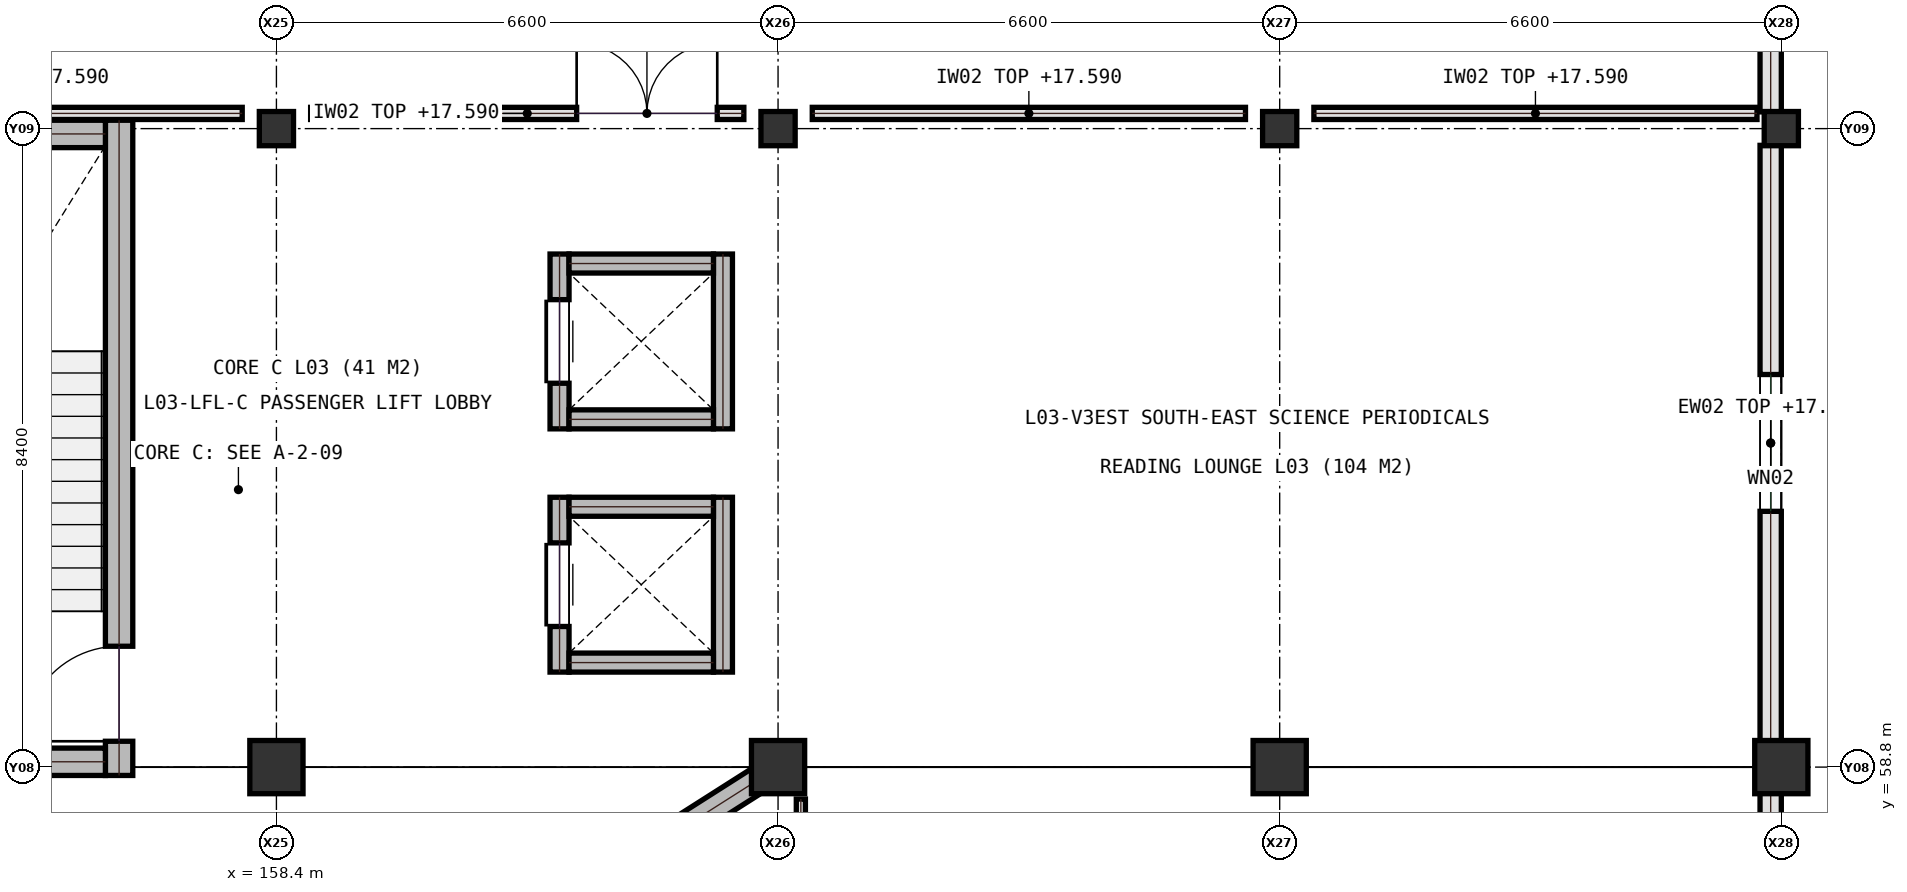
"""IFC4 building model, lengths in metres.
Left out: names, types, materials, properties, quantities, classifications, styles, units other than length and angle.
Written with IfcOpenShell. Run it as: python <this file> out.ifc"""

import sys

from ifc_helpers import new_model, si_unit, direction, frame, frame_2d, origin, origin_2d, place, context, subcontext, project, spatial, rectangle, extrude, element, fill, save


model = new_model("IFC4")
c1 = context("Model", 3, precision=1e-05, world=origin(), true_north=direction((0.0, 1.0)))
c2 = subcontext(c1, "Body", "Model", "MODEL_VIEW")
j1 = project(units=[si_unit("LENGTHUNIT", "METRE"), si_unit("PLANEANGLEUNIT", "RADIAN")], contexts=[c1])
p1 = place(None, origin())
s1 = spatial("IfcSite", under=j1, at=p1, CompositionType="ELEMENT")
p2 = place(p1, origin())
s2 = spatial("IfcBuilding", under=s1, at=p2, CompositionType="ELEMENT")
p3 = place(p2, frame((0.0, 0.0, 14.4)))
s3 = spatial("IfcBuildingStorey", under=s2, at=p3, CompositionType="ELEMENT", Elevation=14.4)
p4 = place(p3, frame((158.4, 58.8, 0.0), z_axis=(0.0, 0.0, 1.0), x_axis=(1.0, 0.0, 0.0)))
e1 = element("IfcColumn", 1, at=p4, inside=s3, PredefinedType="COLUMN", context=c2, shape_type="SweptSolid", body=[
    extrude(rectangle(XDim=0.7, YDim=0.7, at=origin_2d()), origin(), (0.0, 0.0, 1.0), 4.2),
])
p5 = place(p3, frame((158.4, 67.2, 0.0), z_axis=(0.0, 0.0, 1.0), x_axis=(1.0, 0.0, 0.0)))
e2 = element("IfcColumn", 2, at=p5, inside=s3, PredefinedType="COLUMN", context=c2, shape_type="SweptSolid", body=[
    extrude(rectangle(XDim=0.45, YDim=0.45, at=origin_2d()), origin(), (0.0, 0.0, 1.0), 4.2),
])
p6 = place(p3, frame((165.0, 58.8, 0.0), z_axis=(0.0, 0.0, 1.0), x_axis=(1.0, 0.0, 0.0)))
e3 = element("IfcColumn", 3, at=p6, inside=s3, PredefinedType="COLUMN", context=c2, shape_type="SweptSolid", body=[
    extrude(rectangle(XDim=0.7, YDim=0.7, at=origin_2d()), origin(), (0.0, 0.0, 1.0), 4.2),
])
p7 = place(p3, frame((165.0, 67.2, 0.0), z_axis=(0.0, 0.0, 1.0), x_axis=(1.0, 0.0, 0.0)))
e4 = element("IfcColumn", 4, at=p7, inside=s3, PredefinedType="COLUMN", context=c2, shape_type="SweptSolid", body=[
    extrude(rectangle(XDim=0.45, YDim=0.45, at=origin_2d()), origin(), (0.0, 0.0, 1.0), 4.2),
])
p8 = place(p3, frame((171.6, 58.8, 0.0), z_axis=(0.0, 0.0, 1.0), x_axis=(1.0, 0.0, 0.0)))
e5 = element("IfcColumn", 5, at=p8, inside=s3, PredefinedType="COLUMN", context=c2, shape_type="SweptSolid", body=[
    extrude(rectangle(XDim=0.7, YDim=0.7, at=origin_2d()), origin(), (0.0, 0.0, 1.0), 4.2),
])
p9 = place(p3, frame((171.6, 67.2, 0.0), z_axis=(0.0, 0.0, 1.0), x_axis=(1.0, 0.0, 0.0)))
e6 = element("IfcColumn", 6, at=p9, inside=s3, PredefinedType="COLUMN", context=c2, shape_type="SweptSolid", body=[
    extrude(rectangle(XDim=0.45, YDim=0.45, at=origin_2d()), origin(), (0.0, 0.0, 1.0), 4.2),
])
p10 = place(p3, frame((178.2, 58.8, 0.0), z_axis=(0.0, 0.0, 1.0), x_axis=(1.0, 0.0, 0.0)))
e7 = element("IfcColumn", 7, at=p10, inside=s3, PredefinedType="COLUMN", context=c2, shape_type="SweptSolid", body=[
    extrude(rectangle(XDim=0.7, YDim=0.7, at=origin_2d()), origin(), (0.0, 0.0, 1.0), 4.2),
])
p11 = place(p3, frame((178.2, 67.2, 0.0), z_axis=(0.0, 0.0, 1.0), x_axis=(1.0, 0.0, 0.0)))
e8 = element("IfcColumn", 8, at=p11, inside=s3, PredefinedType="COLUMN", context=c2, shape_type="SweptSolid", body=[
    extrude(rectangle(XDim=0.45, YDim=0.45, at=origin_2d()), origin(), (0.0, 0.0, 1.0), 4.2),
])
p12 = place(p3, frame((152.0, 67.4, 0.0), z_axis=(0.0, 0.0, 1.0), x_axis=(1.0, 0.0, 0.0)))
e9 = element("IfcWall", 9, at=p12, inside=s3, PredefinedType="PARTITIONING", context=c2, shape_type="SweptSolid", body=[
    extrude(rectangle(XDim=5.95, YDim=0.16, at=frame_2d((2.975, 0.0))), origin(), (0.0, 0.0, 1.0), 3.19),
])
p13 = place(p3, frame((158.85, 67.4, 0.0), z_axis=(0.0, 0.0, 1.0), x_axis=(1.0, 0.0, 0.0)))
e10 = element("IfcWall", 10, at=p13, inside=s3, PredefinedType="PARTITIONING", context=c2, shape_type="SweptSolid", body=[
    extrude(rectangle(XDim=5.7, YDim=0.16, at=frame_2d((2.85, 0.0))), origin(), (0.0, 0.0, 1.0), 3.19),
])
p14 = place(p13, frame((3.5, 0.0, 0.0)))
e11 = element("IfcOpeningElement", 11, at=p14, cuts=e10, PredefinedType="OPENING", context=c2, shape_type="SweptSolid", body=[
    extrude(rectangle(XDim=1.85, YDim=2.25, at=frame_2d((0.925, 1.125))), frame((0.0, 0.09, 0.0), z_axis=(0.0, -1.0, 0.0), x_axis=(1.0, 0.0, 0.0)), (0.0, 0.0, 1.0), 0.18),
])
p15 = place(p3, frame((165.45, 67.4, 0.0), z_axis=(0.0, 0.0, 1.0), x_axis=(1.0, 0.0, 0.0)))
e12 = element("IfcWall", 12, at=p15, inside=s3, PredefinedType="PARTITIONING", context=c2, shape_type="SweptSolid", body=[
    extrude(rectangle(XDim=5.7, YDim=0.16, at=frame_2d((2.85, 0.0))), origin(), (0.0, 0.0, 1.0), 3.19),
])
p16 = place(p3, frame((172.05, 67.4, 0.0), z_axis=(0.0, 0.0, 1.0), x_axis=(1.0, 0.0, 0.0)))
e13 = element("IfcWall", 13, at=p16, inside=s3, PredefinedType="PARTITIONING", context=c2, shape_type="SweptSolid", body=[
    extrude(rectangle(XDim=5.83, YDim=0.16, at=frame_2d((2.915, 0.0))), origin(), (0.0, 0.0, 1.0), 3.19),
])
p17 = place(p3, frame((165.3, 50.85, 0.0), z_axis=(0.0, 0.0, 1.0), x_axis=(0.0, 1.0, 0.0)))
e14 = element("IfcWall", 14, at=p17, inside=s3, PredefinedType="PARTITIONING", context=c2, shape_type="SweptSolid", body=[
    extrude(rectangle(XDim=7.53, YDim=0.12, at=frame_2d((3.765, 0.0))), origin(), (0.0, 0.0, 1.0), 3.19),
])
p18 = place(p17, frame((4.4, 0.0, 0.0)))
e15 = element("IfcOpeningElement", 15, at=p18, cuts=e14, PredefinedType="OPENING", context=c2, shape_type="SweptSolid", body=[
    extrude(rectangle(XDim=0.95, YDim=2.15, at=frame_2d((0.475, 1.075))), frame((0.0, 0.07, 0.0), z_axis=(0.0, -1.0, 0.0), x_axis=(1.0, 0.0, 0.0)), (0.0, 0.0, 1.0), 0.14),
])
p19 = place(p3, frame((178.06, 50.745, 0.0), z_axis=(0.0, 0.0, 1.0), x_axis=(0.0, 1.0, 0.0)))
e16 = element("IfcWall", 16, at=p19, inside=s3, PredefinedType="SOLIDWALL", context=c2, shape_type="SweptSolid", body=[
    extrude(rectangle(XDim=7.71, YDim=0.28, at=frame_2d((3.855, 0.0))), origin(), (0.0, 0.0, 1.0), 3.225),
])
p20 = place(p19, frame((3.13, 0.0, 0.95)))
e17 = element("IfcOpeningElement", 17, at=p20, cuts=e16, PredefinedType="OPENING", context=c2, shape_type="SweptSolid", body=[
    extrude(rectangle(XDim=1.45, YDim=1.6, at=frame_2d((0.725, 0.8))), frame((0.0, 0.15, 0.0), z_axis=(0.0, -1.0, 0.0), x_axis=(1.0, 0.0, 0.0)), (0.0, 0.0, 1.0), 0.3),
])
p21 = place(p3, frame((178.06, 59.145, 0.0), z_axis=(0.0, 0.0, 1.0), x_axis=(0.0, 1.0, 0.0)))
e18 = element("IfcWall", 18, at=p21, inside=s3, PredefinedType="SOLIDWALL", context=c2, shape_type="SweptSolid", body=[
    extrude(rectangle(XDim=7.835, YDim=0.28, at=frame_2d((3.917, 0.0))), origin(), (0.0, 0.0, 1.0), 3.375),
])
p22 = place(p21, frame((3.02, 0.0, 0.95)))
e19 = element("IfcOpeningElement", 19, at=p22, cuts=e18, PredefinedType="OPENING", context=c2, shape_type="SweptSolid", body=[
    extrude(rectangle(XDim=1.8, YDim=1.6, at=frame_2d((0.9, 0.8))), frame((0.0, 0.15, 0.0), z_axis=(0.0, -1.0, 0.0), x_axis=(1.0, 0.0, 0.0)), (0.0, 0.0, 1.0), 0.3),
])
p23 = place(p3, frame((178.06, 67.42, 0.0), z_axis=(0.0, 0.0, 1.0), x_axis=(0.0, 1.0, 0.0)))
e20 = element("IfcWall", 20, at=p23, inside=s3, PredefinedType="SOLIDWALL", context=c2, shape_type="SweptSolid", body=[
    extrude(rectangle(XDim=7.96, YDim=0.28, at=frame_2d((3.98, 0.0))), origin(), (0.0, 0.0, 1.0), 3.225),
])
p24 = place(p23, frame((3.23, 0.0, 0.95)))
e21 = element("IfcOpeningElement", 21, at=p24, cuts=e20, PredefinedType="OPENING", context=c2, shape_type="SweptSolid", body=[
    extrude(rectangle(XDim=1.5, YDim=2.1, at=frame_2d((0.75, 1.05))), frame((0.0, 0.15, 0.0), z_axis=(0.0, -1.0, 0.0), x_axis=(1.0, 0.0, 0.0)), (0.0, 0.0, 1.0), 0.3),
])
p25 = place(p3, frame((158.65, 54.76, 0.0), z_axis=(0.0, 0.0, 1.0), x_axis=(0.843786613851, 0.536678814829, 0.0)))
e22 = element("IfcWall", 22, at=p25, inside=s3, PredefinedType="SHEAR", context=c2, shape_type="SweptSolid", body=[
    extrude(rectangle(XDim=7.229, YDim=0.34, at=frame_2d((3.615, 0.0))), origin(), (0.0, 0.0, 1.0), 3.94),
])
p26 = place(p3, frame((156.33, 58.69, 0.0), z_axis=(0.0, 0.0, 1.0), x_axis=(0.0, 1.0, 0.0)))
e23 = element("IfcWall", 23, at=p26, inside=s3, PredefinedType="SHEAR", context=c2, shape_type="SweptSolid", body=[
    extrude(rectangle(XDim=8.62, YDim=0.36, at=frame_2d((4.31, 0.0))), origin(), (0.0, 0.0, 1.0), 3.94),
])
p27 = place(p26, frame((0.45, 0.0, 0.0)))
e24 = element("IfcOpeningElement", 24, at=p27, cuts=e23, PredefinedType="OPENING", context=c2, shape_type="SweptSolid", body=[
    extrude(rectangle(XDim=1.25, YDim=2.15, at=frame_2d((0.625, 1.075))), frame((0.0, 0.19, 0.0), z_axis=(0.0, -1.0, 0.0), x_axis=(1.0, 0.0, 0.0)), (0.0, 0.0, 1.0), 0.38),
])
for number, where, z_axis, x_axis in (
    (25, (152.35, 67.13, 0.0), (0.0, 0.0, 1.0), (1.0, 0.0, 0.0)),
    (26, (152.35, 58.87, 0.0), (0.0, 0.0, 1.0), (1.0, 0.0, 0.0)),
):
    element("IfcWall", number, at=place(p3, frame(where, z_axis=z_axis, x_axis=x_axis)), inside=s3, PredefinedType="SHEAR", context=c2, shape_type="SweptSolid", body=[
        extrude(rectangle(XDim=3.8, YDim=0.36, at=frame_2d((1.9, 0.0))), origin(), (0.0, 0.0, 1.0), 3.94),
    ])
p28 = place(p3, frame((162.125, 60.05, 0.0), z_axis=(0.0, 0.0, 1.0), x_axis=(0.0, 1.0, 0.0)))
e27 = element("IfcWall", 27, at=p28, inside=s3, PredefinedType="SHEAR", context=c2, shape_type="SweptSolid", body=[
    extrude(rectangle(XDim=2.3, YDim=0.25, at=frame_2d((1.15, 0.0))), origin(), (0.0, 0.0, 1.0), 3.94),
])
p29 = place(p28, frame((0.6, 0.0, 0.0)))
e28 = element("IfcOpeningElement", 28, at=p29, cuts=e27, PredefinedType="OPENING", context=c2, shape_type="SweptSolid", body=[
    extrude(rectangle(XDim=1.1, YDim=2.15, at=frame_2d((0.55, 1.075))), frame((0.0, 0.135, 0.0), z_axis=(0.0, -1.0, 0.0), x_axis=(1.0, 0.0, 0.0)), (0.0, 0.0, 1.0), 0.27),
])
p30 = place(p3, frame((164.275, 60.05, 0.0), z_axis=(0.0, 0.0, 1.0), x_axis=(0.0, 1.0, 0.0)))
e29 = element("IfcWall", 29, at=p30, inside=s3, PredefinedType="SHEAR", context=c2, shape_type="SweptSolid", body=[
    extrude(rectangle(XDim=2.3, YDim=0.25, at=frame_2d((1.15, 0.0))), origin(), (0.0, 0.0, 1.0), 3.94),
])
for number, where, z_axis, x_axis in (
    (30, (162.25, 60.175, 0.0), (0.0, 0.0, 1.0), (1.0, 0.0, 0.0)),
    (31, (162.25, 62.225, 0.0), (0.0, 0.0, 1.0), (1.0, 0.0, 0.0)),
):
    element("IfcWall", number, at=place(p3, frame(where, z_axis=z_axis, x_axis=x_axis)), inside=s3, PredefinedType="SHEAR", context=c2, shape_type="SweptSolid", body=[
        extrude(rectangle(XDim=1.9, YDim=0.25, at=frame_2d((0.95, 0.0))), origin(), (0.0, 0.0, 1.0), 3.94),
    ])
p31 = place(p3, frame((162.125, 63.25, 0.0), z_axis=(0.0, 0.0, 1.0), x_axis=(0.0, 1.0, 0.0)))
e32 = element("IfcWall", 32, at=p31, inside=s3, PredefinedType="SHEAR", context=c2, shape_type="SweptSolid", body=[
    extrude(rectangle(XDim=2.3, YDim=0.25, at=frame_2d((1.15, 0.0))), origin(), (0.0, 0.0, 1.0), 3.94),
])
p32 = place(p31, frame((0.6, 0.0, 0.0)))
e33 = element("IfcOpeningElement", 33, at=p32, cuts=e32, PredefinedType="OPENING", context=c2, shape_type="SweptSolid", body=[
    extrude(rectangle(XDim=1.1, YDim=2.15, at=frame_2d((0.55, 1.075))), frame((0.0, 0.135, 0.0), z_axis=(0.0, -1.0, 0.0), x_axis=(1.0, 0.0, 0.0)), (0.0, 0.0, 1.0), 0.27),
])
p33 = place(p3, frame((164.275, 63.25, 0.0), z_axis=(0.0, 0.0, 1.0), x_axis=(0.0, 1.0, 0.0)))
e34 = element("IfcWall", 34, at=p33, inside=s3, PredefinedType="SHEAR", context=c2, shape_type="SweptSolid", body=[
    extrude(rectangle(XDim=2.3, YDim=0.25, at=frame_2d((1.15, 0.0))), origin(), (0.0, 0.0, 1.0), 3.94),
])
for number, where, z_axis, x_axis in (
    (35, (162.25, 63.375, 0.0), (0.0, 0.0, 1.0), (1.0, 0.0, 0.0)),
    (36, (162.25, 65.425, 0.0), (0.0, 0.0, 1.0), (1.0, 0.0, 0.0)),
):
    element("IfcWall", number, at=place(p3, frame(where, z_axis=z_axis, x_axis=x_axis)), inside=s3, PredefinedType="SHEAR", context=c2, shape_type="SweptSolid", body=[
        extrude(rectangle(XDim=1.9, YDim=0.25, at=frame_2d((0.95, 0.0))), origin(), (0.0, 0.0, 1.0), 3.94),
    ])
p34 = place(p14, origin())
e37 = element("IfcDoor", 37, at=p34, inside=s3, OperationType="DOUBLE_DOOR_SINGLE_SWING", PredefinedType="DOOR", context=c2, shape_type="SweptSolid", body=[
    extrude(rectangle(XDim=1.85, YDim=2.25, at=frame_2d((0.925, 1.125))), frame((0.0, 0.025, 0.0), z_axis=(0.0, -1.0, 0.0), x_axis=(1.0, 0.0, 0.0)), (0.0, 0.0, 1.0), 0.05),
])
fill(e11, e37)
p35 = place(p22, origin())
e38 = element("IfcWindow", 38, at=p35, inside=s3, PartitioningType="SINGLE_PANEL", PredefinedType="WINDOW", context=c2, shape_type="SweptSolid", body=[
    extrude(rectangle(XDim=1.8, YDim=1.6, at=frame_2d((0.9, 0.8))), frame((0.0, 0.03, 0.0), z_axis=(0.0, -1.0, 0.0), x_axis=(1.0, 0.0, 0.0)), (0.0, 0.0, 1.0), 0.06),
])
fill(e19, e38)
p36 = place(p27, origin())
e39 = element("IfcDoor", 39, at=p36, inside=s3, OperationType="SINGLE_SWING_LEFT", PredefinedType="DOOR", context=c2, shape_type="SweptSolid", body=[
    extrude(rectangle(XDim=1.25, YDim=2.15, at=frame_2d((0.625, 1.075))), frame((0.0, 0.025, 0.0), z_axis=(0.0, -1.0, 0.0), x_axis=(1.0, 0.0, 0.0)), (0.0, 0.0, 1.0), 0.05),
])
fill(e24, e39)
p37 = place(p29, origin())
e40 = element("IfcDoor", 40, at=p37, inside=s3, OperationType="SLIDING_TO_LEFT", PredefinedType="DOOR", context=c2, shape_type="SweptSolid", body=[
    extrude(rectangle(XDim=1.1, YDim=2.15, at=frame_2d((0.55, 1.075))), frame((0.0, 0.025, 0.0), z_axis=(0.0, -1.0, 0.0), x_axis=(1.0, 0.0, 0.0)), (0.0, 0.0, 1.0), 0.05),
])
fill(e28, e40)
p38 = place(p32, origin())
e41 = element("IfcDoor", 41, at=p38, inside=s3, OperationType="SLIDING_TO_LEFT", PredefinedType="DOOR", context=c2, shape_type="SweptSolid", body=[
    extrude(rectangle(XDim=1.1, YDim=2.15, at=frame_2d((0.55, 1.075))), frame((0.0, 0.025, 0.0), z_axis=(0.0, -1.0, 0.0), x_axis=(1.0, 0.0, 0.0)), (0.0, 0.0, 1.0), 0.05),
])
fill(e33, e41)
save(model, sys.argv[1])
